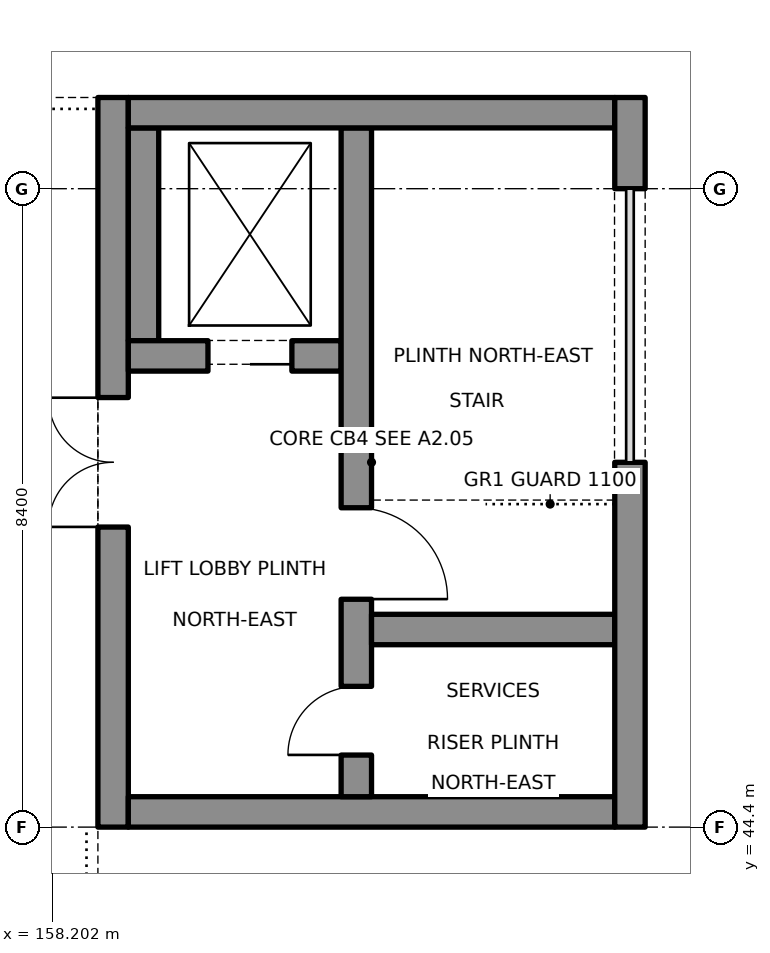
"""IFC4 building model, lengths in metres.
Left out: names, types, materials, properties, quantities, classifications, styles, units other than length and angle.
Written with IfcOpenShell. Run it as: python <this file> out.ifc"""

import sys

from ifc_helpers import new_model, si_unit, direction, frame, frame_2d, origin, place, context, subcontext, project, spatial, rectangle, extrude, element, fill, save


model = new_model("IFC4")
c1 = context("Model", 3, precision=1e-05, world=origin(), true_north=direction((0.0, 1.0)))
c2 = subcontext(c1, "Body", "Model", "MODEL_VIEW")
j1 = project(units=[si_unit("LENGTHUNIT", "METRE"), si_unit("PLANEANGLEUNIT", "RADIAN")], contexts=[c1])
p1 = place(None, origin())
s1 = spatial("IfcSite", under=j1, at=p1, CompositionType="ELEMENT")
p2 = place(p1, origin())
s2 = spatial("IfcBuilding", under=s1, at=p2, CompositionType="ELEMENT")
p3 = place(p2, frame((0.0, 0.0, 14.0)))
s3 = spatial("IfcBuildingStorey", under=s2, at=p3, CompositionType="ELEMENT", Elevation=14.0)
p4 = place(p3, frame((165.8, 49.2, 0.0), z_axis=(0.0, 0.0, 1.0), x_axis=(0.0, -1.0, 0.0)))
e1 = element("IfcWall", 1, at=p4, inside=s3, PredefinedType="SHEAR", context=c2, shape_type="SweptSolid", body=[
    extrude(rectangle(XDim=4.8, YDim=0.4, at=frame_2d((2.4, 0.0))), origin(), (0.0, 0.0, 1.0), 4.2),
])
p5 = place(p3, frame((165.8, 54.0, 0.0), z_axis=(0.0, 0.0, 1.0), x_axis=(0.0, -1.0, 0.0)))
e2 = element("IfcWall", 2, at=p5, inside=s3, PredefinedType="SHEAR", context=c2, shape_type="SweptSolid", body=[
    extrude(rectangle(XDim=1.2, YDim=0.4, at=frame_2d((0.6, 0.0))), origin(), (0.0, 0.0, 1.0), 4.2),
])
p6 = place(p3, frame((159.0, 44.4, 0.0), z_axis=(0.0, 0.0, 1.0), x_axis=(0.0, 1.0, 0.0)))
e3 = element("IfcWall", 3, at=p6, inside=s3, PredefinedType="SHEAR", context=c2, shape_type="SweptSolid", body=[
    extrude(rectangle(XDim=9.6, YDim=0.4, at=frame_2d((4.8, 0.0))), origin(), (0.0, 0.0, 1.0), 4.2),
])
p7 = place(p6, frame((3.95, 0.0, 0.0)))
e4 = element("IfcOpeningElement", 4, at=p7, cuts=e3, PredefinedType="OPENING", context=c2, shape_type="SweptSolid", body=[
    extrude(rectangle(XDim=1.7, YDim=2.1, at=frame_2d((0.85, 1.05))), frame((0.0, 0.21, 0.0), z_axis=(0.0, -1.0, 0.0), x_axis=(1.0, 0.0, 0.0)), (0.0, 0.0, 1.0), 0.42),
])
for number, where, z_axis, x_axis in (
    (5, (159.2, 53.8, 0.0), (0.0, 0.0, 1.0), (1.0, 0.0, 0.0)),
    (6, (159.2, 44.6, 0.0), (0.0, 0.0, 1.0), (1.0, 0.0, 0.0)),
):
    element("IfcWall", number, at=place(p3, frame(where, z_axis=z_axis, x_axis=x_axis)), inside=s3, PredefinedType="SHEAR", context=c2, shape_type="SweptSolid", body=[
        extrude(rectangle(XDim=6.4, YDim=0.4, at=frame_2d((3.2, 0.0))), origin(), (0.0, 0.0, 1.0), 4.2),
    ])
p8 = place(p3, frame((162.2, 44.8, 0.0), z_axis=(0.0, 0.0, 1.0), x_axis=(0.0, 1.0, 0.0)))
e7 = element("IfcWall", 7, at=p8, inside=s3, PredefinedType="SHEAR", context=c2, shape_type="SweptSolid", body=[
    extrude(rectangle(XDim=8.8, YDim=0.4, at=frame_2d((4.4, 0.0))), origin(), (0.0, 0.0, 1.0), 4.2),
])
p9 = place(p8, frame((2.6, 0.0, 0.0)))
e8 = element("IfcOpeningElement", 8, at=p9, cuts=e7, PredefinedType="OPENING", context=c2, shape_type="SweptSolid", body=[
    extrude(rectangle(XDim=1.2, YDim=2.1, at=frame_2d((0.6, 1.05))), frame((0.0, 0.21, 0.0), z_axis=(0.0, -1.0, 0.0), x_axis=(1.0, 0.0, 0.0)), (0.0, 0.0, 1.0), 0.42),
])
p10 = place(p8, frame((0.55, 0.0, 0.0)))
e9 = element("IfcOpeningElement", 9, at=p10, cuts=e7, PredefinedType="OPENING", context=c2, shape_type="SweptSolid", body=[
    extrude(rectangle(XDim=0.9, YDim=2.1, at=frame_2d((0.45, 1.05))), frame((0.0, 0.21, 0.0), z_axis=(0.0, -1.0, 0.0), x_axis=(1.0, 0.0, 0.0)), (0.0, 0.0, 1.0), 0.42),
])
p11 = place(p3, frame((162.4, 47.0, 0.0), z_axis=(0.0, 0.0, 1.0), x_axis=(1.0, 0.0, 0.0)))
e10 = element("IfcWall", 10, at=p11, inside=s3, PredefinedType="SHEAR", context=c2, shape_type="SweptSolid", body=[
    extrude(rectangle(XDim=3.2, YDim=0.4, at=frame_2d((1.6, 0.0))), origin(), (0.0, 0.0, 1.0), 4.2),
])
p12 = place(p3, frame((159.2, 50.6, 0.0), z_axis=(0.0, 0.0, 1.0), x_axis=(1.0, 0.0, 0.0)))
e11 = element("IfcWall", 11, at=p12, inside=s3, PredefinedType="SHEAR", context=c2, shape_type="SweptSolid", body=[
    extrude(rectangle(XDim=2.8, YDim=0.4, at=frame_2d((1.4, 0.0))), origin(), (0.0, 0.0, 1.0), 4.2),
])
p13 = place(p12, frame((1.05, 0.0, 0.0)))
e12 = element("IfcOpeningElement", 12, at=p13, cuts=e11, PredefinedType="OPENING", context=c2, shape_type="SweptSolid", body=[
    extrude(rectangle(XDim=1.1, YDim=2.1, at=frame_2d((0.55, 1.05))), frame((0.0, 0.21, 0.0), z_axis=(0.0, -1.0, 0.0), x_axis=(1.0, 0.0, 0.0)), (0.0, 0.0, 1.0), 0.42),
])
p14 = place(p3, frame((159.4, 50.8, 0.0), z_axis=(0.0, 0.0, 1.0), x_axis=(0.0, 1.0, 0.0)))
e13 = element("IfcWall", 13, at=p14, inside=s3, PredefinedType="SHEAR", context=c2, shape_type="SweptSolid", body=[
    extrude(rectangle(XDim=2.8, YDim=0.4, at=frame_2d((1.4, 0.0))), origin(), (0.0, 0.0, 1.0), 4.2),
])
p15 = place(p7, origin())
e14 = element("IfcDoor", 14, at=p15, inside=s3, OperationType="DOUBLE_DOOR_SINGLE_SWING", PredefinedType="DOOR", context=c2, shape_type="SweptSolid", body=[
    extrude(rectangle(XDim=1.7, YDim=2.1, at=frame_2d((0.85, 1.05))), frame((0.0, 0.025, 0.0), z_axis=(0.0, -1.0, 0.0), x_axis=(1.0, 0.0, 0.0)), (0.0, 0.0, 1.0), 0.05),
])
fill(e4, e14)
p16 = place(p9, origin())
e15 = element("IfcDoor", 15, at=p16, inside=s3, OperationType="SINGLE_SWING_LEFT", PredefinedType="DOOR", context=c2, shape_type="SweptSolid", body=[
    extrude(rectangle(XDim=1.2, YDim=2.1, at=frame_2d((0.6, 1.05))), frame((0.0, 0.025, 0.0), z_axis=(0.0, -1.0, 0.0), x_axis=(1.0, 0.0, 0.0)), (0.0, 0.0, 1.0), 0.05),
])
fill(e8, e15)
p17 = place(p10, origin())
e16 = element("IfcDoor", 16, at=p17, inside=s3, OperationType="SINGLE_SWING_LEFT", PredefinedType="DOOR", context=c2, shape_type="SweptSolid", body=[
    extrude(rectangle(XDim=0.9, YDim=2.1, at=frame_2d((0.45, 1.05))), frame((0.0, 0.025, 0.0), z_axis=(0.0, -1.0, 0.0), x_axis=(1.0, 0.0, 0.0)), (0.0, 0.0, 1.0), 0.05),
])
fill(e9, e16)
p18 = place(p13, origin())
e17 = element("IfcDoor", 17, at=p18, inside=s3, OperationType="SLIDING_TO_LEFT", PredefinedType="DOOR", context=c2, shape_type="SweptSolid", body=[
    extrude(rectangle(XDim=1.1, YDim=2.1, at=frame_2d((0.55, 1.05))), frame((0.0, 0.025, 0.0), z_axis=(0.0, -1.0, 0.0), x_axis=(1.0, 0.0, 0.0)), (0.0, 0.0, 1.0), 0.05),
])
fill(e12, e17)
save(model, sys.argv[1])
